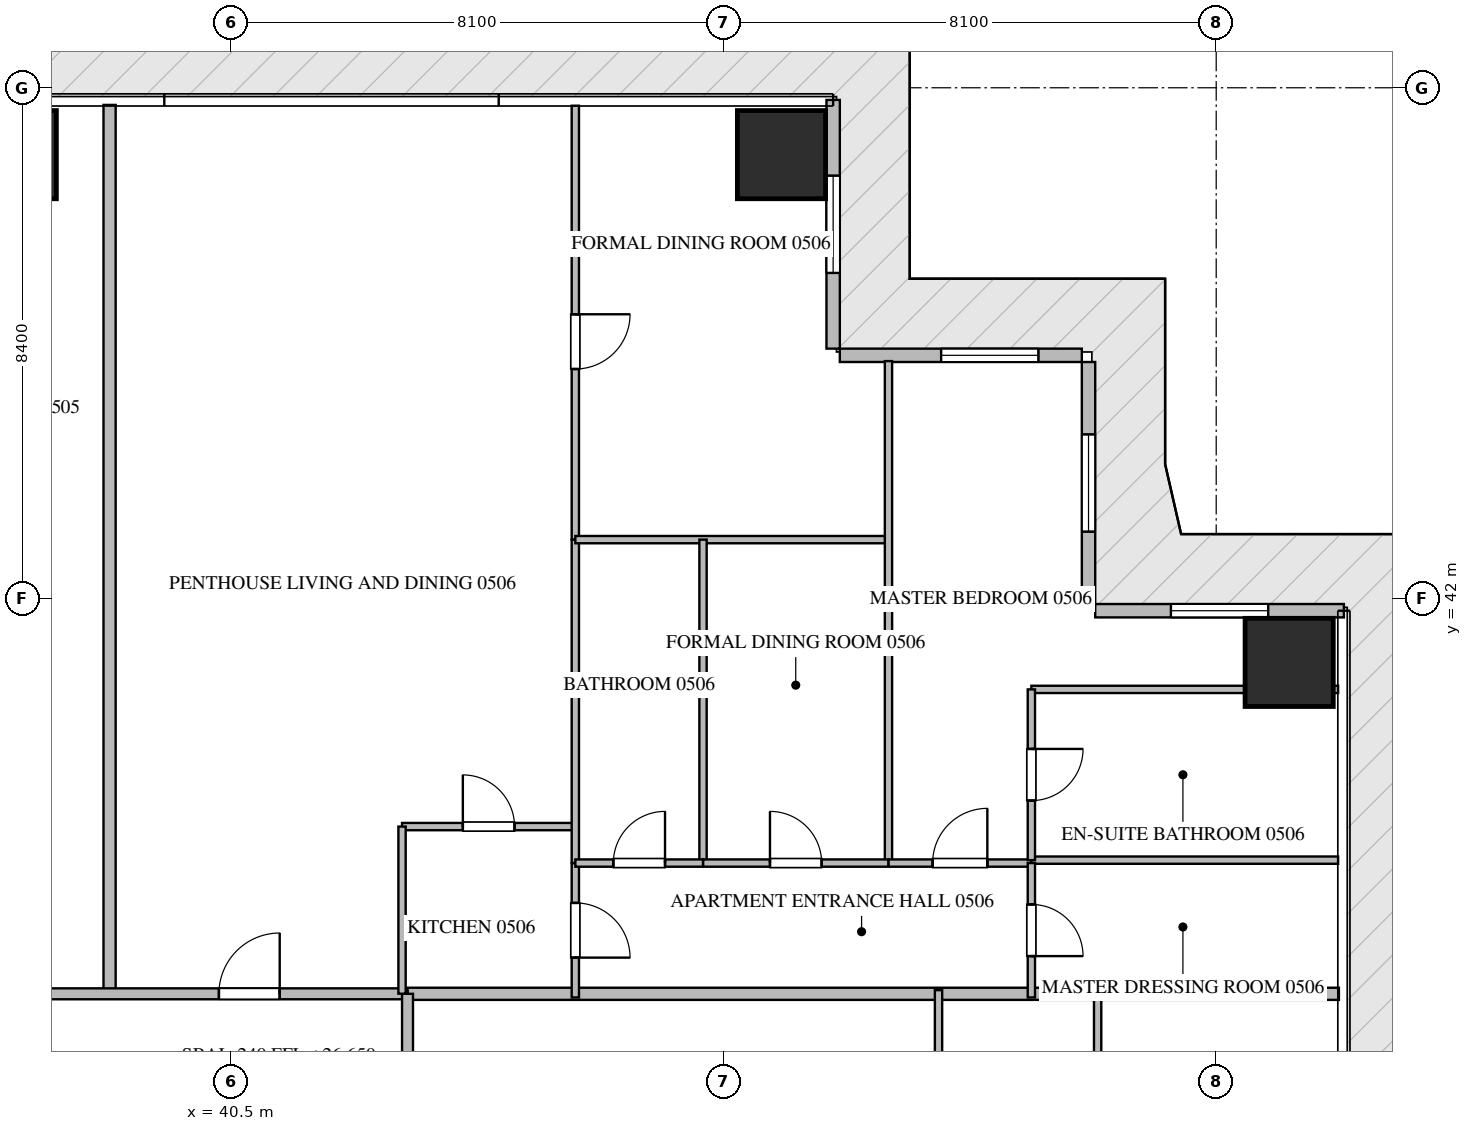
"""IFC4 building model, lengths in metres.
Left out: names, types, materials, properties, quantities, classifications, styles, units other than length and angle.
Written with IfcOpenShell. Run it as: python <this file> out.ifc"""

import sys

from ifc_helpers import new_model, si_unit, direction, frame, frame_2d, origin, origin_2d, place, context, subcontext, project, spatial, rectangle, extrude, source, transform, mapped, element, fill, save


model = new_model("IFC4")
c1 = context("Model", 3, precision=1e-05, world=origin(), true_north=direction((0.0, 1.0)))
c2 = subcontext(c1, "Body", "Model", "MODEL_VIEW")
j1 = project(units=[si_unit("LENGTHUNIT", "METRE"), si_unit("PLANEANGLEUNIT", "RADIAN")], contexts=[c1])
p1 = place(None, origin())
s1 = spatial("IfcSite", under=j1, at=p1, CompositionType="ELEMENT")
p2 = place(p1, origin())
s2 = spatial("IfcBuilding", under=s1, at=p2, CompositionType="ELEMENT")
p3 = place(p2, frame((0.0, 0.0, 26.7)))
s3 = spatial("IfcBuildingStorey", under=s2, at=p3, CompositionType="ELEMENT", Elevation=26.7)
m1 = source(origin(), c2, "Body", "SweptSolid", [
    extrude(rectangle(XDim=1.45, YDim=1.45, at=origin_2d()), origin(), (0.0, 0.0, 1.0), 3.93),
])
for number, where, z_axis, x_axis in (
    (1, (36.9, 49.3, -0.44), (0.0, 0.0, 1.0), (1.0, 0.0, 0.0)),
    (2, (49.55, 49.3, -0.44), (0.0, 0.0, 1.0), (1.0, 0.0, 0.0)),
    (3, (57.9, 40.95, -0.44), (0.0, 0.0, 1.0), (1.0, 0.0, 0.0)),
):
    element("IfcColumn", number, at=place(p3, frame(where, z_axis=z_axis, x_axis=x_axis)), inside=s3, PredefinedType="COLUMN", context=c2, shape_type="MappedRepresentation", body=[
        mapped(m1, transform((0.0, 0.0, 0.0), scale=1.0)),
    ])
p4 = place(p3, frame((58.8, 41.8, 0.0), z_axis=(0.0, 0.0, 1.0), x_axis=(-1.0, 0.0, 0.0)))
e4 = element("IfcWall", 4, at=p4, inside=s3, PredefinedType="ELEMENTEDWALL", context=c2, shape_type="SweptSolid", body=[
    extrude(rectangle(XDim=4.09, YDim=0.22, at=frame_2d((2.045, 0.0))), origin(), (0.0, 0.0, 1.0), 3.475),
])
p5 = place(p4, frame((1.245, 0.0, 0.65)))
e5 = element("IfcOpeningElement", 5, at=p5, cuts=e4, PredefinedType="OPENING", context=c2, shape_type="SweptSolid", body=[
    extrude(rectangle(XDim=1.6, YDim=2.1, at=frame_2d((0.8, 1.05))), frame((0.0, 0.12, 0.0), z_axis=(0.0, -1.0, 0.0), x_axis=(1.0, 0.0, 0.0)), (0.0, 0.0, 1.0), 0.24),
])
p6 = place(p3, frame((54.6, 41.91, 0.0), z_axis=(0.0, 0.0, 1.0), x_axis=(0.0, 1.0, 0.0)))
e6 = element("IfcWall", 6, at=p6, inside=s3, PredefinedType="ELEMENTEDWALL", context=c2, shape_type="SweptSolid", body=[
    extrude(rectangle(XDim=3.98, YDim=0.22, at=frame_2d((1.99, 0.0))), origin(), (0.0, 0.0, 1.0), 3.475),
])
p7 = place(p6, frame((1.19, 0.0, 0.65)))
e7 = element("IfcOpeningElement", 7, at=p7, cuts=e6, PredefinedType="OPENING", context=c2, shape_type="SweptSolid", body=[
    extrude(rectangle(XDim=1.6, YDim=2.1, at=frame_2d((0.8, 1.05))), frame((0.0, 0.12, 0.0), z_axis=(0.0, -1.0, 0.0), x_axis=(1.0, 0.0, 0.0)), (0.0, 0.0, 1.0), 0.24),
])
p8 = place(p3, frame((54.49, 46.0, 0.0), z_axis=(0.0, 0.0, 1.0), x_axis=(-1.0, 0.0, 0.0)))
e8 = element("IfcWall", 8, at=p8, inside=s3, PredefinedType="ELEMENTEDWALL", context=c2, shape_type="SweptSolid", body=[
    extrude(rectangle(XDim=3.98, YDim=0.22, at=frame_2d((1.99, 0.0))), origin(), (0.0, 0.0, 1.0), 3.475),
])
p9 = place(p8, frame((0.714, 0.0, 0.65)))
e9 = element("IfcOpeningElement", 9, at=p9, cuts=e8, PredefinedType="OPENING", context=c2, shape_type="SweptSolid", body=[
    extrude(rectangle(XDim=1.6, YDim=2.1, at=frame_2d((0.8, 1.05))), frame((0.0, 0.12, 0.0), z_axis=(0.0, -1.0, 0.0), x_axis=(1.0, 0.0, 0.0)), (0.0, 0.0, 1.0), 0.24),
])
p10 = place(p3, frame((50.4, 46.11, 0.0), z_axis=(0.0, 0.0, 1.0), x_axis=(0.0, 1.0, 0.0)))
e10 = element("IfcWall", 10, at=p10, inside=s3, PredefinedType="ELEMENTEDWALL", context=c2, shape_type="SweptSolid", body=[
    extrude(rectangle(XDim=4.09, YDim=0.22, at=frame_2d((2.045, 0.0))), origin(), (0.0, 0.0, 1.0), 3.475),
])
p11 = place(p10, frame((1.245, 0.0, 0.65)))
e11 = element("IfcOpeningElement", 11, at=p11, cuts=e10, PredefinedType="OPENING", context=c2, shape_type="SweptSolid", body=[
    extrude(rectangle(XDim=1.6, YDim=2.1, at=frame_2d((0.8, 1.05))), frame((0.0, 0.12, 0.0), z_axis=(0.0, -1.0, 0.0), x_axis=(1.0, 0.0, 0.0)), (0.0, 0.0, 1.0), 0.24),
])
p12 = place(p3, frame((38.5, 35.5, 0.0), z_axis=(0.0, 0.0, 1.0), x_axis=(0.0, 1.0, 0.0)))
e12 = element("IfcWall", 12, at=p12, inside=s3, PredefinedType="PARTITIONING", context=c2, shape_type="SweptSolid", body=[
    extrude(rectangle(XDim=14.618, YDim=0.2, at=frame_2d((7.309, 0.0))), origin(), (0.0, 0.0, 1.0), 3.49),
])
p13 = place(p3, frame((43.4, 35.5, 0.0), z_axis=(0.0, 0.0, 1.0), x_axis=(1.0, 0.0, 0.0)))
e13 = element("IfcWall", 13, at=p13, inside=s3, PredefinedType="PARTITIONING", context=c2, shape_type="SweptSolid", body=[
    extrude(rectangle(XDim=15.318, YDim=0.2, at=frame_2d((7.659, 0.0))), origin(), (0.0, 0.0, 1.0), 3.49),
])
p14 = place(p3, frame((21.402, 35.5, 0.0), z_axis=(0.0, 0.0, 1.0), x_axis=(1.0, 0.0, 0.0)))
e14 = element("IfcWall", 14, at=p14, inside=s3, PredefinedType="PARTITIONING", context=c2, shape_type="SweptSolid", body=[
    extrude(rectangle(XDim=21.996, YDim=0.18, at=frame_2d((10.998, 0.0))), origin(), (0.0, 0.0, 1.0), 3.49),
])
p15 = place(p14, frame((2.1, 0.0, 0.0)))
e15 = element("IfcOpeningElement", 15, at=p15, cuts=e14, PredefinedType="OPENING", context=c2, shape_type="SweptSolid", body=[
    extrude(rectangle(XDim=1.0, YDim=2.15, at=frame_2d((0.5, 1.075))), frame((0.0, 0.1, 0.0), z_axis=(0.0, -1.0, 0.0), x_axis=(1.0, 0.0, 0.0)), (0.0, 0.0, 1.0), 0.2),
])
p16 = place(p14, frame((14.277, 0.0, 0.0)))
e16 = element("IfcOpeningElement", 16, at=p16, cuts=e14, PredefinedType="OPENING", context=c2, shape_type="SweptSolid", body=[
    extrude(rectangle(XDim=1.0, YDim=2.15, at=frame_2d((0.5, 1.075))), frame((0.0, 0.1, 0.0), z_axis=(0.0, -1.0, 0.0), x_axis=(1.0, 0.0, 0.0)), (0.0, 0.0, 1.0), 0.2),
])
p17 = place(p14, frame((18.896, 0.0, 0.0)))
e17 = element("IfcOpeningElement", 17, at=p17, cuts=e14, PredefinedType="OPENING", context=c2, shape_type="SweptSolid", body=[
    extrude(rectangle(XDim=1.0, YDim=2.15, at=frame_2d((0.5, 1.075))), frame((0.0, 0.1, 0.0), z_axis=(0.0, -1.0, 0.0), x_axis=(1.0, 0.0, 0.0)), (0.0, 0.0, 1.0), 0.2),
])
p18 = place(p3, frame((43.4, 14.9, 0.0), z_axis=(0.0, 0.0, 1.0), x_axis=(0.0, 1.0, 0.0)))
e18 = element("IfcWall", 18, at=p18, inside=s3, PredefinedType="PARTITIONING", context=c2, shape_type="SweptSolid", body=[
    extrude(rectangle(XDim=20.6, YDim=0.18, at=frame_2d((10.3, 0.0))), origin(), (0.0, 0.0, 1.0), 3.49),
])
p19 = place(p18, frame((1.96, 0.0, 0.0)))
e19 = element("IfcOpeningElement", 19, at=p19, cuts=e18, PredefinedType="OPENING", context=c2, shape_type="SweptSolid", body=[
    extrude(rectangle(XDim=1.0, YDim=2.15, at=frame_2d((0.5, 1.075))), frame((0.0, 0.1, 0.0), z_axis=(0.0, -1.0, 0.0), x_axis=(1.0, 0.0, 0.0)), (0.0, 0.0, 1.0), 0.2),
])
p20 = place(p3, frame((43.31, 38.25, 0.0), z_axis=(0.0, 0.0, 1.0), x_axis=(1.0, 0.0, 0.0)))
e20 = element("IfcWall", 20, at=p20, inside=s3, PredefinedType="PARTITIONING", context=c2, shape_type="SweptSolid", body=[
    extrude(rectangle(XDim=2.85, YDim=0.12, at=frame_2d((1.425, 0.0))), origin(), (0.0, 0.0, 1.0), 3.49),
])
p21 = place(p20, frame((1.0, 0.0, 0.0)))
e21 = element("IfcOpeningElement", 21, at=p21, cuts=e20, PredefinedType="OPENING", context=c2, shape_type="SweptSolid", body=[
    extrude(rectangle(XDim=0.85, YDim=2.1, at=frame_2d((0.425, 1.05))), frame((0.0, 0.07, 0.0), z_axis=(0.0, -1.0, 0.0), x_axis=(1.0, 0.0, 0.0)), (0.0, 0.0, 1.0), 0.14),
])
p22 = place(p3, frame((43.31, 38.25, 0.0), z_axis=(0.0, 0.0, 1.0), x_axis=(0.0, -1.0, 0.0)))
e22 = element("IfcWall", 22, at=p22, inside=s3, PredefinedType="PARTITIONING", context=c2, shape_type="SweptSolid", body=[
    extrude(rectangle(XDim=2.748, YDim=0.12, at=frame_2d((1.374, 0.0))), origin(), (0.0, 0.0, 1.0), 3.49),
])
p23 = place(p3, frame((46.16, 37.65, 0.0), z_axis=(0.0, 0.0, 1.0), x_axis=(0.0, -1.0, 0.0)))
e23 = element("IfcWall", 23, at=p23, inside=s3, PredefinedType="PARTITIONING", context=c2, shape_type="SweptSolid", body=[
    extrude(rectangle(XDim=2.21, YDim=0.12, at=frame_2d((1.105, 0.0))), origin(), (0.0, 0.0, 1.0), 3.49),
])
p24 = place(p23, frame((0.655, 0.0, 0.0)))
e24 = element("IfcOpeningElement", 24, at=p24, cuts=e23, PredefinedType="OPENING", context=c2, shape_type="SweptSolid", body=[
    extrude(rectangle(XDim=0.9, YDim=2.1, at=frame_2d((0.45, 1.05))), frame((0.0, 0.07, 0.0), z_axis=(0.0, -1.0, 0.0), x_axis=(1.0, 0.0, 0.0)), (0.0, 0.0, 1.0), 0.14),
])
p25 = place(p3, frame((46.16, 50.105, 0.0), z_axis=(0.0, 0.0, 1.0), x_axis=(0.0, -1.0, 0.0)))
e25 = element("IfcWall", 25, at=p25, inside=s3, PredefinedType="PARTITIONING", context=c2, shape_type="SweptSolid", body=[
    extrude(rectangle(XDim=7.136, YDim=0.12, at=frame_2d((3.568, 0.0))), origin(), (0.0, 0.0, 1.0), 3.49),
])
p26 = place(p25, frame((3.43, 0.0, 0.0)))
e26 = element("IfcOpeningElement", 26, at=p26, cuts=e25, PredefinedType="OPENING", context=c2, shape_type="SweptSolid", body=[
    extrude(rectangle(XDim=0.9, YDim=2.1, at=frame_2d((0.45, 1.05))), frame((0.0, 0.07, 0.0), z_axis=(0.0, -1.0, 0.0), x_axis=(1.0, 0.0, 0.0)), (0.0, 0.0, 1.0), 0.14),
])
p27 = place(p3, frame((46.16, 42.967, 0.0), z_axis=(0.0, 0.0, 1.0), x_axis=(0.0, -1.0, 0.0)))
e27 = element("IfcWall", 27, at=p27, inside=s3, PredefinedType="PARTITIONING", context=c2, shape_type="SweptSolid", body=[
    extrude(rectangle(XDim=5.315, YDim=0.12, at=frame_2d((2.657, 0.0))), origin(), (0.0, 0.0, 1.0), 3.49),
])
p28 = place(p3, frame((46.16, 42.969, 0.0), z_axis=(0.0, 0.0, 1.0), x_axis=(1.0, 0.0, 0.0)))
e28 = element("IfcWall", 28, at=p28, inside=s3, PredefinedType="PARTITIONING", context=c2, shape_type="SweptSolid", body=[
    extrude(rectangle(XDim=5.15, YDim=0.12, at=frame_2d((2.575, 0.0))), origin(), (0.0, 0.0, 1.0), 3.49),
])
p29 = place(p3, frame((51.31, 45.905, 0.0), z_axis=(0.0, 0.0, 1.0), x_axis=(0.0, -1.0, 0.0)))
e29 = element("IfcWall", 29, at=p29, inside=s3, PredefinedType="PARTITIONING", context=c2, shape_type="SweptSolid", body=[
    extrude(rectangle(XDim=8.255, YDim=0.12, at=frame_2d((4.127, 0.0))), origin(), (0.0, 0.0, 1.0), 3.49),
])
p30 = place(p3, frame((48.26, 42.969, 0.0), z_axis=(0.0, 0.0, 1.0), x_axis=(0.0, -1.0, 0.0)))
e30 = element("IfcWall", 30, at=p30, inside=s3, PredefinedType="PARTITIONING", context=c2, shape_type="SweptSolid", body=[
    extrude(rectangle(XDim=5.319, YDim=0.12, at=frame_2d((2.66, 0.0))), origin(), (0.0, 0.0, 1.0), 3.49),
])
p31 = place(p3, frame((46.16, 37.65, 0.0), z_axis=(0.0, 0.0, 1.0), x_axis=(1.0, 0.0, 0.0)))
e31 = element("IfcWall", 31, at=p31, inside=s3, PredefinedType="PARTITIONING", context=c2, shape_type="SweptSolid", body=[
    extrude(rectangle(XDim=2.1, YDim=0.12, at=frame_2d((1.05, 0.0))), origin(), (0.0, 0.0, 1.0), 3.49),
])
p32 = place(p31, frame((0.625, 0.0, 0.0)))
e32 = element("IfcOpeningElement", 32, at=p32, cuts=e31, PredefinedType="OPENING", context=c2, shape_type="SweptSolid", body=[
    extrude(rectangle(XDim=0.85, YDim=2.1, at=frame_2d((0.425, 1.05))), frame((0.0, 0.07, 0.0), z_axis=(0.0, -1.0, 0.0), x_axis=(1.0, 0.0, 0.0)), (0.0, 0.0, 1.0), 0.14),
])
p33 = place(p3, frame((48.262, 37.65, 0.0), z_axis=(0.0, 0.0, 1.0), x_axis=(1.0, 0.0, 0.0)))
e33 = element("IfcWall", 33, at=p33, inside=s3, PredefinedType="PARTITIONING", context=c2, shape_type="SweptSolid", body=[
    extrude(rectangle(XDim=3.048, YDim=0.12, at=frame_2d((1.524, 0.0))), origin(), (0.0, 0.0, 1.0), 3.49),
])
p34 = place(p33, frame((1.099, 0.0, 0.0)))
e34 = element("IfcOpeningElement", 34, at=p34, cuts=e33, PredefinedType="OPENING", context=c2, shape_type="SweptSolid", body=[
    extrude(rectangle(XDim=0.85, YDim=2.1, at=frame_2d((0.425, 1.05))), frame((0.0, 0.07, 0.0), z_axis=(0.0, -1.0, 0.0), x_axis=(1.0, 0.0, 0.0)), (0.0, 0.0, 1.0), 0.14),
])
p35 = place(p3, frame((51.312, 37.65, 0.0), z_axis=(0.0, 0.0, 1.0), x_axis=(1.0, 0.0, 0.0)))
e35 = element("IfcWall", 35, at=p35, inside=s3, PredefinedType="PARTITIONING", context=c2, shape_type="SweptSolid", body=[
    extrude(rectangle(XDim=2.348, YDim=0.12, at=frame_2d((1.174, 0.0))), origin(), (0.0, 0.0, 1.0), 3.49),
])
p36 = place(p35, frame((0.724, 0.0, 0.0)))
e36 = element("IfcOpeningElement", 36, at=p36, cuts=e35, PredefinedType="OPENING", context=c2, shape_type="SweptSolid", body=[
    extrude(rectangle(XDim=0.9, YDim=2.1, at=frame_2d((0.45, 1.05))), frame((0.0, 0.07, 0.0), z_axis=(0.0, -1.0, 0.0), x_axis=(1.0, 0.0, 0.0)), (0.0, 0.0, 1.0), 0.14),
])
p37 = place(p3, frame((53.66, 40.506, 0.0), z_axis=(0.0, 0.0, 1.0), x_axis=(1.0, 0.0, 0.0)))
e37 = element("IfcWall", 37, at=p37, inside=s3, PredefinedType="PARTITIONING", context=c2, shape_type="SweptSolid", body=[
    extrude(rectangle(XDim=5.045, YDim=0.12, at=frame_2d((2.522, 0.0))), origin(), (0.0, 0.0, 1.0), 3.49),
])
p38 = place(p3, frame((53.662, 37.698, 0.0), z_axis=(0.0, 0.0, 1.0), x_axis=(1.0, 0.0, 0.0)))
e38 = element("IfcWall", 38, at=p38, inside=s3, PredefinedType="PARTITIONING", context=c2, shape_type="SweptSolid", body=[
    extrude(rectangle(XDim=5.043, YDim=0.12, at=frame_2d((2.521, 0.0))), origin(), (0.0, 0.0, 1.0), 3.49),
])
p39 = place(p3, frame((53.66, 40.506, 0.0), z_axis=(0.0, 0.0, 1.0), x_axis=(0.0, -1.0, 0.0)))
e39 = element("IfcWall", 39, at=p39, inside=s3, PredefinedType="PARTITIONING", context=c2, shape_type="SweptSolid", body=[
    extrude(rectangle(XDim=2.808, YDim=0.12, at=frame_2d((1.404, 0.0))), origin(), (0.0, 0.0, 1.0), 3.49),
])
p40 = place(p39, frame((0.979, 0.0, 0.0)))
e40 = element("IfcOpeningElement", 40, at=p40, cuts=e39, PredefinedType="OPENING", context=c2, shape_type="SweptSolid", body=[
    extrude(rectangle(XDim=0.85, YDim=2.1, at=frame_2d((0.425, 1.05))), frame((0.0, 0.07, 0.0), z_axis=(0.0, -1.0, 0.0), x_axis=(1.0, 0.0, 0.0)), (0.0, 0.0, 1.0), 0.14),
])
p41 = place(p3, frame((53.66, 37.65, 0.0), z_axis=(0.0, 0.0, 1.0), x_axis=(0.0, -1.0, 0.0)))
e41 = element("IfcWall", 41, at=p41, inside=s3, PredefinedType="PARTITIONING", context=c2, shape_type="SweptSolid", body=[
    extrude(rectangle(XDim=2.21, YDim=0.12, at=frame_2d((1.105, 0.0))), origin(), (0.0, 0.0, 1.0), 3.49),
])
p42 = place(p41, frame((0.68, 0.0, 0.0)))
e42 = element("IfcOpeningElement", 42, at=p42, cuts=e41, PredefinedType="OPENING", context=c2, shape_type="SweptSolid", body=[
    extrude(rectangle(XDim=0.85, YDim=2.1, at=frame_2d((0.425, 1.05))), frame((0.0, 0.07, 0.0), z_axis=(0.0, -1.0, 0.0), x_axis=(1.0, 0.0, 0.0)), (0.0, 0.0, 1.0), 0.14),
])
for number, where, z_axis, x_axis in (
    (43, (54.75, 30.15, 0.0), (0.0, 0.0, 1.0), (0.0, 1.0, 0.0)),
    (44, (52.133, 30.15, 0.0), (0.0, 0.0, 1.0), (0.0, 1.0, 0.0)),
):
    element("IfcWall", number, at=place(p3, frame(where, z_axis=z_axis, x_axis=x_axis)), inside=s3, PredefinedType="PARTITIONING", context=c2, shape_type="SweptSolid", body=[
        extrude(rectangle(XDim=5.41, YDim=0.12, at=frame_2d((2.705, 0.0))), origin(), (0.0, 0.0, 1.0), 3.49),
    ])
m2 = source(origin(), c2, "Body", "SweptSolid", [
    extrude(rectangle(XDim=1.6, YDim=2.1, at=frame_2d((0.8, 1.05))), frame((0.0, 0.03, 0.0), z_axis=(0.0, -1.0, 0.0), x_axis=(1.0, 0.0, 0.0)), (0.0, 0.0, 1.0), 0.06),
])
p43 = place(p5, origin())
e45 = element("IfcWindow", 45, at=p43, inside=s3, PartitioningType="SINGLE_PANEL", PredefinedType="WINDOW", context=c2, shape_type="MappedRepresentation", body=[
    mapped(m2, transform((0.0, 0.0, 0.0), scale=1.0)),
])
fill(e5, e45)
p44 = place(p7, origin())
e46 = element("IfcWindow", 46, at=p44, inside=s3, PartitioningType="SINGLE_PANEL", PredefinedType="WINDOW", context=c2, shape_type="MappedRepresentation", body=[
    mapped(m2, transform((0.0, 0.0, 0.0), scale=1.0)),
])
fill(e7, e46)
p45 = place(p9, origin())
e47 = element("IfcWindow", 47, at=p45, inside=s3, PartitioningType="SINGLE_PANEL", PredefinedType="WINDOW", context=c2, shape_type="MappedRepresentation", body=[
    mapped(m2, transform((0.0, 0.0, 0.0), scale=1.0)),
])
fill(e9, e47)
p46 = place(p11, origin())
e48 = element("IfcWindow", 48, at=p46, inside=s3, PartitioningType="SINGLE_PANEL", PredefinedType="WINDOW", context=c2, shape_type="MappedRepresentation", body=[
    mapped(m2, transform((0.0, 0.0, 0.0), scale=1.0)),
])
fill(e11, e48)
m3 = source(origin(), c2, "Body", "SweptSolid", [
    extrude(rectangle(XDim=1.0, YDim=2.15, at=frame_2d((0.5, 1.075))), frame((0.0, 0.025, 0.0), z_axis=(0.0, -1.0, 0.0), x_axis=(1.0, 0.0, 0.0)), (0.0, 0.0, 1.0), 0.05),
])
p47 = place(p17, origin())
e49 = element("IfcDoor", 49, at=p47, inside=s3, OperationType="SINGLE_SWING_RIGHT", PredefinedType="DOOR", context=c2, shape_type="MappedRepresentation", body=[
    mapped(m3, transform((0.0, 0.0, 0.0), scale=1.0)),
])
fill(e17, e49)
m4 = source(origin(), c2, "Body", "SweptSolid", [
    extrude(rectangle(XDim=0.85, YDim=2.1, at=frame_2d((0.425, 1.05))), frame((0.0, 0.025, 0.0), z_axis=(0.0, -1.0, 0.0), x_axis=(1.0, 0.0, 0.0)), (0.0, 0.0, 1.0), 0.05),
])
p48 = place(p21, origin())
e50 = element("IfcDoor", 50, at=p48, inside=s3, OperationType="SINGLE_SWING_LEFT", PredefinedType="DOOR", context=c2, shape_type="MappedRepresentation", body=[
    mapped(m4, transform((0.0, 0.0, 0.0), scale=1.0)),
])
fill(e21, e50)
m5 = source(origin(), c2, "Body", "SweptSolid", [
    extrude(rectangle(XDim=0.9, YDim=2.1, at=frame_2d((0.45, 1.05))), frame((0.0, 0.025, 0.0), z_axis=(0.0, -1.0, 0.0), x_axis=(1.0, 0.0, 0.0)), (0.0, 0.0, 1.0), 0.05),
])
p49 = place(p24, origin())
e51 = element("IfcDoor", 51, at=p49, inside=s3, OperationType="SINGLE_SWING_RIGHT", PredefinedType="DOOR", context=c2, shape_type="MappedRepresentation", body=[
    mapped(m5, transform((0.0, 0.0, 0.0), scale=1.0)),
])
fill(e24, e51)
p50 = place(p26, origin())
e52 = element("IfcDoor", 52, at=p50, inside=s3, OperationType="SINGLE_SWING_LEFT", PredefinedType="DOOR", context=c2, shape_type="MappedRepresentation", body=[
    mapped(m5, transform((0.0, 0.0, 0.0), scale=1.0)),
])
fill(e26, e52)
p51 = place(p32, origin())
e53 = element("IfcDoor", 53, at=p51, inside=s3, OperationType="SINGLE_SWING_RIGHT", PredefinedType="DOOR", context=c2, shape_type="MappedRepresentation", body=[
    mapped(m4, transform((0.0, 0.0, 0.0), scale=1.0)),
])
fill(e32, e53)
p52 = place(p34, origin())
e54 = element("IfcDoor", 54, at=p52, inside=s3, OperationType="SINGLE_SWING_LEFT", PredefinedType="DOOR", context=c2, shape_type="MappedRepresentation", body=[
    mapped(m4, transform((0.0, 0.0, 0.0), scale=1.0)),
])
fill(e34, e54)
p53 = place(p36, origin())
e55 = element("IfcDoor", 55, at=p53, inside=s3, OperationType="SINGLE_SWING_RIGHT", PredefinedType="DOOR", context=c2, shape_type="MappedRepresentation", body=[
    mapped(m5, transform((0.0, 0.0, 0.0), scale=1.0)),
])
fill(e36, e55)
p54 = place(p40, origin())
e56 = element("IfcDoor", 56, at=p54, inside=s3, OperationType="SINGLE_SWING_LEFT", PredefinedType="DOOR", context=c2, shape_type="MappedRepresentation", body=[
    mapped(m4, transform((0.0, 0.0, 0.0), scale=1.0)),
])
fill(e40, e56)
p55 = place(p42, origin())
e57 = element("IfcDoor", 57, at=p55, inside=s3, OperationType="SINGLE_SWING_RIGHT", PredefinedType="DOOR", context=c2, shape_type="MappedRepresentation", body=[
    mapped(m4, transform((0.0, 0.0, 0.0), scale=1.0)),
])
fill(e42, e57)
save(model, sys.argv[1])
